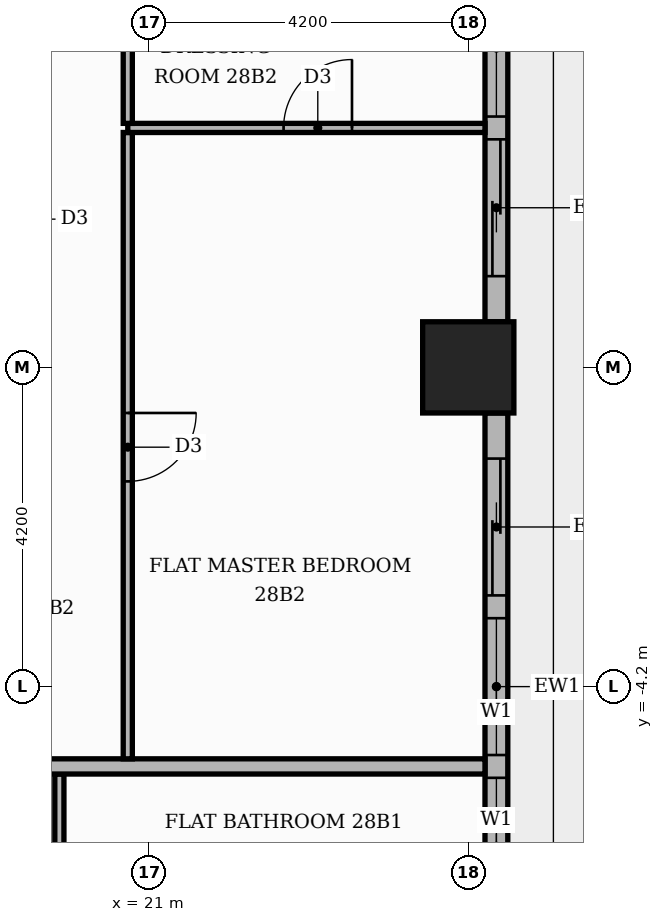
"""IFC4 building model, lengths in metres.
Left out: names, types, materials, properties, quantities, classifications, styles, units other than length and angle.
Written with IfcOpenShell. Run it as: python <this file> out.ifc"""

import sys

from ifc_helpers import new_model, si_unit, direction, frame, frame_2d, origin, origin_2d, place, context, subcontext, project, spatial, rectangle, extrude, element, fill, save


model = new_model("IFC4")
c1 = context("Model", 3, precision=1e-05, world=origin(), true_north=direction((0.0, 1.0)))
c2 = subcontext(c1, "Body", "Model", "MODEL_VIEW")
j1 = project(units=[si_unit("LENGTHUNIT", "METRE"), si_unit("PLANEANGLEUNIT", "RADIAN")], contexts=[c1])
p1 = place(None, origin())
s1 = spatial("IfcSite", under=j1, at=p1, CompositionType="ELEMENT")
p2 = place(p1, origin())
s2 = spatial("IfcBuilding", under=s1, at=p2, CompositionType="ELEMENT")
p3 = place(p2, frame((0.0, 0.0, 118.2)))
s3 = spatial("IfcBuildingStorey", under=s2, at=p3, CompositionType="ELEMENT", Elevation=118.2)
p4 = place(p3, frame((25.2, 0.0, 0.0), z_axis=(0.0, 0.0, 1.0), x_axis=(1.0, 0.0, 0.0)))
e1 = element("IfcColumn", 1, at=p4, inside=s3, PredefinedType="COLUMN", context=c2, shape_type="SweptSolid", body=[
    extrude(rectangle(XDim=1.2, YDim=1.2, at=origin_2d()), origin(), (0.0, 0.0, 1.0), 3.9),
])
p5 = place(p3, frame((25.57, -7.8, 0.0), z_axis=(0.0, 0.0, 1.0), x_axis=(0.0, 1.0, 0.0)))
e2 = element("IfcWall", 2, at=p5, inside=s3, PredefinedType="STANDARD", context=c2, shape_type="SweptSolid", body=[
    extrude(rectangle(XDim=7.2, YDim=0.3, at=frame_2d((3.6, 0.0))), origin(), (0.0, 0.0, 1.0), 3.48),
])
p6 = place(p5, frame((0.6, 0.0, 0.9)))
e3 = element("IfcOpeningElement", 3, at=p6, cuts=e2, PredefinedType="OPENING", context=c2, shape_type="SweptSolid", body=[
    extrude(rectangle(XDim=1.8, YDim=2.1, at=frame_2d((0.9, 1.05))), frame((0.0, 0.16, 0.0), z_axis=(0.0, -1.0, 0.0), x_axis=(1.0, 0.0, 0.0)), (0.0, 0.0, 1.0), 0.32),
])
p7 = place(p5, frame((2.7, 0.0, 0.9)))
e4 = element("IfcOpeningElement", 4, at=p7, cuts=e2, PredefinedType="OPENING", context=c2, shape_type="SweptSolid", body=[
    extrude(rectangle(XDim=1.8, YDim=2.1, at=frame_2d((0.9, 1.05))), frame((0.0, 0.16, 0.0), z_axis=(0.0, -1.0, 0.0), x_axis=(1.0, 0.0, 0.0)), (0.0, 0.0, 1.0), 0.32),
])
p8 = place(p5, frame((4.8, 0.0, 0.0)))
e5 = element("IfcOpeningElement", 5, at=p8, cuts=e2, PredefinedType="OPENING", context=c2, shape_type="SweptSolid", body=[
    extrude(rectangle(XDim=1.8, YDim=2.4, at=frame_2d((0.9, 1.2))), frame((0.0, 0.16, 0.0), z_axis=(0.0, -1.0, 0.0), x_axis=(1.0, 0.0, 0.0)), (0.0, 0.0, 1.0), 0.32),
])
p9 = place(p3, frame((25.57, 0.6, 0.0), z_axis=(0.0, 0.0, 1.0), x_axis=(0.0, 1.0, 0.0)))
e6 = element("IfcWall", 6, at=p9, inside=s3, PredefinedType="STANDARD", context=c2, shape_type="SweptSolid", body=[
    extrude(rectangle(XDim=7.2, YDim=0.3, at=frame_2d((3.6, 0.0))), origin(), (0.0, 0.0, 1.0), 3.48),
])
p10 = place(p9, frame((0.6, 0.0, 0.0)))
e7 = element("IfcOpeningElement", 7, at=p10, cuts=e6, PredefinedType="OPENING", context=c2, shape_type="SweptSolid", body=[
    extrude(rectangle(XDim=1.8, YDim=2.4, at=frame_2d((0.9, 1.2))), frame((0.0, 0.16, 0.0), z_axis=(0.0, -1.0, 0.0), x_axis=(1.0, 0.0, 0.0)), (0.0, 0.0, 1.0), 0.32),
])
p11 = place(p9, frame((2.7, 0.0, 0.9)))
e8 = element("IfcOpeningElement", 8, at=p11, cuts=e6, PredefinedType="OPENING", context=c2, shape_type="SweptSolid", body=[
    extrude(rectangle(XDim=1.8, YDim=2.1, at=frame_2d((0.9, 1.05))), frame((0.0, 0.16, 0.0), z_axis=(0.0, -1.0, 0.0), x_axis=(1.0, 0.0, 0.0)), (0.0, 0.0, 1.0), 0.32),
])
p12 = place(p9, frame((4.8, 0.0, 0.9)))
e9 = element("IfcOpeningElement", 9, at=p12, cuts=e6, PredefinedType="OPENING", context=c2, shape_type="SweptSolid", body=[
    extrude(rectangle(XDim=1.8, YDim=2.1, at=frame_2d((0.9, 1.05))), frame((0.0, 0.16, 0.0), z_axis=(0.0, -1.0, 0.0), x_axis=(1.0, 0.0, 0.0)), (0.0, 0.0, 1.0), 0.32),
])
p13 = place(p3, frame((19.82, -7.29, 0.0), z_axis=(0.0, 0.0, 1.0), x_axis=(0.0, 1.0, 0.0)))
e10 = element("IfcWall", 10, at=p13, inside=s3, PredefinedType="PARTITIONING", context=c2, shape_type="SweptSolid", body=[
    extrude(rectangle(XDim=1.94, YDim=0.12, at=frame_2d((0.97, 0.0))), origin(), (0.0, 0.0, 1.0), 3.48),
])
p14 = place(p3, frame((13.65, -5.25, 0.0), z_axis=(0.0, 0.0, 1.0), x_axis=(1.0, 0.0, 0.0)))
e11 = element("IfcWall", 11, at=p14, inside=s3, PredefinedType="PARTITIONING", context=c2, shape_type="SweptSolid", body=[
    extrude(rectangle(XDim=11.77, YDim=0.2, at=frame_2d((5.885, 0.0))), origin(), (0.0, 0.0, 1.0), 3.48),
])
p15 = place(p3, frame((20.72, -5.15, 0.0), z_axis=(0.0, 0.0, 1.0), x_axis=(0.0, 1.0, 0.0)))
e12 = element("IfcWall", 12, at=p15, inside=s3, PredefinedType="PARTITIONING", context=c2, shape_type="SweptSolid", body=[
    extrude(rectangle(XDim=8.24, YDim=0.12, at=frame_2d((4.12, 0.0))), origin(), (0.0, 0.0, 1.0), 3.48),
])
p16 = place(p15, frame((3.65, 0.0, 0.0)))
e13 = element("IfcOpeningElement", 13, at=p16, cuts=e12, PredefinedType="OPENING", context=c2, shape_type="SweptSolid", body=[
    extrude(rectangle(XDim=0.9, YDim=2.1, at=frame_2d((0.45, 1.05))), frame((0.0, 0.07, 0.0), z_axis=(0.0, -1.0, 0.0), x_axis=(1.0, 0.0, 0.0)), (0.0, 0.0, 1.0), 0.14),
])
p17 = place(p3, frame((20.72, 3.15, 0.0), z_axis=(0.0, 0.0, 1.0), x_axis=(1.0, 0.0, 0.0)))
e14 = element("IfcWall", 14, at=p17, inside=s3, PredefinedType="PARTITIONING", context=c2, shape_type="SweptSolid", body=[
    extrude(rectangle(XDim=4.7, YDim=0.12, at=frame_2d((2.35, 0.0))), origin(), (0.0, 0.0, 1.0), 3.48),
])
p18 = place(p17, frame((2.05, 0.0, 0.0)))
e15 = element("IfcOpeningElement", 15, at=p18, cuts=e14, PredefinedType="OPENING", context=c2, shape_type="SweptSolid", body=[
    extrude(rectangle(XDim=0.9, YDim=2.1, at=frame_2d((0.45, 1.05))), frame((0.0, 0.07, 0.0), z_axis=(0.0, -1.0, 0.0), x_axis=(1.0, 0.0, 0.0)), (0.0, 0.0, 1.0), 0.14),
])
p19 = place(p3, frame((20.72, 3.21, 0.0), z_axis=(0.0, 0.0, 1.0), x_axis=(0.0, 1.0, 0.0)))
e16 = element("IfcWall", 16, at=p19, inside=s3, PredefinedType="PARTITIONING", context=c2, shape_type="SweptSolid", body=[
    extrude(rectangle(XDim=1.98, YDim=0.12, at=frame_2d((0.99, 0.0))), origin(), (0.0, 0.0, 1.0), 3.48),
])
p20 = place(p6, origin())
e17 = element("IfcWindow", 17, at=p20, inside=s3, PartitioningType="SINGLE_PANEL", PredefinedType="WINDOW", context=c2, shape_type="SweptSolid", body=[
    extrude(rectangle(XDim=1.8, YDim=2.1, at=frame_2d((0.9, 1.05))), frame((0.0, 0.03, 0.0), z_axis=(0.0, -1.0, 0.0), x_axis=(1.0, 0.0, 0.0)), (0.0, 0.0, 1.0), 0.06),
])
fill(e3, e17)
p21 = place(p7, origin())
e18 = element("IfcWindow", 18, at=p21, inside=s3, PartitioningType="SINGLE_PANEL", PredefinedType="WINDOW", context=c2, shape_type="SweptSolid", body=[
    extrude(rectangle(XDim=1.8, YDim=2.1, at=frame_2d((0.9, 1.05))), frame((0.0, 0.03, 0.0), z_axis=(0.0, -1.0, 0.0), x_axis=(1.0, 0.0, 0.0)), (0.0, 0.0, 1.0), 0.06),
])
fill(e4, e18)
p22 = place(p8, origin())
e19 = element("IfcDoor", 19, at=p22, inside=s3, OperationType="SLIDING_TO_RIGHT", PredefinedType="DOOR", context=c2, shape_type="SweptSolid", body=[
    extrude(rectangle(XDim=1.8, YDim=2.4, at=frame_2d((0.9, 1.2))), frame((0.0, 0.025, 0.0), z_axis=(0.0, -1.0, 0.0), x_axis=(1.0, 0.0, 0.0)), (0.0, 0.0, 1.0), 0.05),
])
fill(e5, e19)
p23 = place(p10, origin())
e20 = element("IfcDoor", 20, at=p23, inside=s3, OperationType="SLIDING_TO_LEFT", PredefinedType="DOOR", context=c2, shape_type="SweptSolid", body=[
    extrude(rectangle(XDim=1.8, YDim=2.4, at=frame_2d((0.9, 1.2))), frame((0.0, 0.025, 0.0), z_axis=(0.0, -1.0, 0.0), x_axis=(1.0, 0.0, 0.0)), (0.0, 0.0, 1.0), 0.05),
])
fill(e7, e20)
p24 = place(p11, origin())
e21 = element("IfcWindow", 21, at=p24, inside=s3, PartitioningType="SINGLE_PANEL", PredefinedType="WINDOW", context=c2, shape_type="SweptSolid", body=[
    extrude(rectangle(XDim=1.8, YDim=2.1, at=frame_2d((0.9, 1.05))), frame((0.0, 0.03, 0.0), z_axis=(0.0, -1.0, 0.0), x_axis=(1.0, 0.0, 0.0)), (0.0, 0.0, 1.0), 0.06),
])
fill(e8, e21)
p25 = place(p16, frame((0.9, 0.0, 0.0), z_axis=(0.0, 0.0, 1.0), x_axis=(-1.0, 0.0, 0.0)))
e22 = element("IfcDoor", 22, at=p25, inside=s3, OperationType="SINGLE_SWING_RIGHT", PredefinedType="DOOR", context=c2, shape_type="SweptSolid", body=[
    extrude(rectangle(XDim=0.9, YDim=2.1, at=frame_2d((0.45, 1.05))), frame((0.0, 0.025, 0.0), z_axis=(0.0, -1.0, 0.0), x_axis=(1.0, 0.0, 0.0)), (0.0, 0.0, 1.0), 0.05),
])
fill(e13, e22)
p26 = place(p18, origin())
e23 = element("IfcDoor", 23, at=p26, inside=s3, OperationType="SINGLE_SWING_RIGHT", PredefinedType="DOOR", context=c2, shape_type="SweptSolid", body=[
    extrude(rectangle(XDim=0.9, YDim=2.1, at=frame_2d((0.45, 1.05))), frame((0.0, 0.025, 0.0), z_axis=(0.0, -1.0, 0.0), x_axis=(1.0, 0.0, 0.0)), (0.0, 0.0, 1.0), 0.05),
])
fill(e15, e23)
save(model, sys.argv[1])
